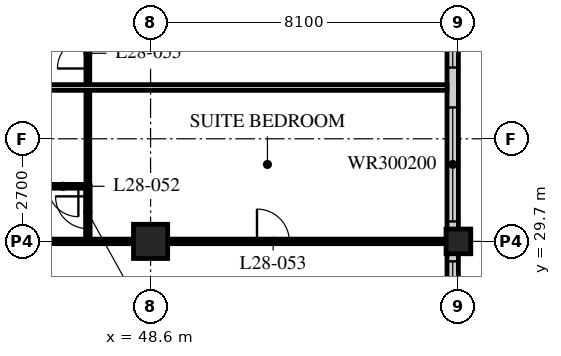
"""IFC4 building model, lengths in metres.
Left out: names, types, materials, properties, quantities, classifications, styles, units other than length and angle.
Written with IfcOpenShell. Run it as: python <this file> out.ifc"""

import sys

from ifc_helpers import new_model, si_unit, direction, frame, frame_2d, origin, origin_2d, place, context, subcontext, project, spatial, rectangle, hollow_rectangle, extrude, element, fill, save


model = new_model("IFC4")
c1 = context("Model", 3, precision=1e-05, world=origin(), true_north=direction((0.0, 1.0)))
c2 = subcontext(c1, "Body", "Model", "MODEL_VIEW")
j1 = project(units=[si_unit("LENGTHUNIT", "METRE"), si_unit("PLANEANGLEUNIT", "RADIAN")], contexts=[c1])
p1 = place(None, origin())
s1 = spatial("IfcSite", under=j1, at=p1, CompositionType="ELEMENT")
p2 = place(p1, origin())
s2 = spatial("IfcBuilding", under=s1, at=p2, CompositionType="ELEMENT")
p3 = place(p2, frame((0.0, 0.0, 113.6)))
s3 = spatial("IfcBuildingStorey", under=s2, at=p3, CompositionType="ELEMENT", Elevation=113.6)
p4 = place(p3, frame((48.6, 29.7, 0.0), z_axis=(0.0, 0.0, 1.0), x_axis=(1.0, 0.0, 0.0)))
e1 = element("IfcColumn", 1, at=p4, inside=s3, PredefinedType="COLUMN", context=c2, shape_type="SweptSolid", body=[
    extrude(hollow_rectangle(XDim=0.9, YDim=0.9, WallThickness=0.09, at=origin_2d()), origin(), (0.0, 0.0, 1.0), 3.4),
])
p5 = place(p3, frame((56.7, 29.7, 0.0), z_axis=(0.0, 0.0, 1.0), x_axis=(1.0, 0.0, 0.0)))
e2 = element("IfcColumn", 2, at=p5, inside=s3, PredefinedType="COLUMN", context=c2, shape_type="SweptSolid", body=[
    extrude(hollow_rectangle(XDim=0.65, YDim=0.65, WallThickness=0.055, at=origin_2d()), origin(), (0.0, 0.0, 1.0), 3.4),
])
p6 = place(p3, frame((56.55, 13.8, 0.0), z_axis=(0.0, 0.0, 1.0), x_axis=(0.0, 1.0, 0.0)))
e3 = element("IfcWall", 3, at=p6, inside=s3, PredefinedType="SOLIDWALL", context=c2, shape_type="SweptSolid", body=[
    extrude(rectangle(XDim=32.1, YDim=0.3, at=frame_2d((16.05, 0.0))), origin(), (0.0, 0.0, 1.0), 3.19),
])
p7 = place(p6, frame((0.225, 0.0, 0.9)))
e4 = element("IfcOpeningElement", 4, at=p7, cuts=e3, PredefinedType="OPENING", context=c2, shape_type="SweptSolid", body=[
    extrude(rectangle(XDim=3.0, YDim=2.0, at=frame_2d((1.5, 1.0))), frame((0.0, 0.16, 0.0), z_axis=(0.0, -1.0, 0.0), x_axis=(1.0, 0.0, 0.0)), (0.0, 0.0, 1.0), 0.32),
])
p8 = place(p6, frame((4.275, 0.0, 0.9)))
e5 = element("IfcOpeningElement", 5, at=p8, cuts=e3, PredefinedType="OPENING", context=c2, shape_type="SweptSolid", body=[
    extrude(rectangle(XDim=3.0, YDim=2.0, at=frame_2d((1.5, 1.0))), frame((0.0, 0.16, 0.0), z_axis=(0.0, -1.0, 0.0), x_axis=(1.0, 0.0, 0.0)), (0.0, 0.0, 1.0), 0.32),
])
p9 = place(p6, frame((8.325, 0.0, 0.9)))
e6 = element("IfcOpeningElement", 6, at=p9, cuts=e3, PredefinedType="OPENING", context=c2, shape_type="SweptSolid", body=[
    extrude(rectangle(XDim=3.0, YDim=2.0, at=frame_2d((1.5, 1.0))), frame((0.0, 0.16, 0.0), z_axis=(0.0, -1.0, 0.0), x_axis=(1.0, 0.0, 0.0)), (0.0, 0.0, 1.0), 0.32),
])
p10 = place(p6, frame((12.375, 0.0, 0.9)))
e7 = element("IfcOpeningElement", 7, at=p10, cuts=e3, PredefinedType="OPENING", context=c2, shape_type="SweptSolid", body=[
    extrude(rectangle(XDim=3.0, YDim=2.0, at=frame_2d((1.5, 1.0))), frame((0.0, 0.16, 0.0), z_axis=(0.0, -1.0, 0.0), x_axis=(1.0, 0.0, 0.0)), (0.0, 0.0, 1.0), 0.32),
])
p11 = place(p6, frame((16.425, 0.0, 0.9)))
e8 = element("IfcOpeningElement", 8, at=p11, cuts=e3, PredefinedType="OPENING", context=c2, shape_type="SweptSolid", body=[
    extrude(rectangle(XDim=3.0, YDim=2.0, at=frame_2d((1.5, 1.0))), frame((0.0, 0.16, 0.0), z_axis=(0.0, -1.0, 0.0), x_axis=(1.0, 0.0, 0.0)), (0.0, 0.0, 1.0), 0.32),
])
p12 = place(p6, frame((20.475, 0.0, 0.9)))
e9 = element("IfcOpeningElement", 9, at=p12, cuts=e3, PredefinedType="OPENING", context=c2, shape_type="SweptSolid", body=[
    extrude(rectangle(XDim=3.0, YDim=2.0, at=frame_2d((1.5, 1.0))), frame((0.0, 0.16, 0.0), z_axis=(0.0, -1.0, 0.0), x_axis=(1.0, 0.0, 0.0)), (0.0, 0.0, 1.0), 0.32),
])
p13 = place(p6, frame((24.525, 0.0, 0.9)))
e10 = element("IfcOpeningElement", 10, at=p13, cuts=e3, PredefinedType="OPENING", context=c2, shape_type="SweptSolid", body=[
    extrude(rectangle(XDim=3.0, YDim=2.0, at=frame_2d((1.5, 1.0))), frame((0.0, 0.16, 0.0), z_axis=(0.0, -1.0, 0.0), x_axis=(1.0, 0.0, 0.0)), (0.0, 0.0, 1.0), 0.32),
])
p14 = place(p6, frame((28.575, 0.0, 0.9)))
e11 = element("IfcOpeningElement", 11, at=p14, cuts=e3, PredefinedType="OPENING", context=c2, shape_type="SweptSolid", body=[
    extrude(rectangle(XDim=3.0, YDim=2.0, at=frame_2d((1.5, 1.0))), frame((0.0, 0.16, 0.0), z_axis=(0.0, -1.0, 0.0), x_axis=(1.0, 0.0, 0.0)), (0.0, 0.0, 1.0), 0.32),
])
p15 = place(p3, frame((46.95, 31.15, 0.0), z_axis=(0.0, 0.0, 1.0), x_axis=(0.0, 1.0, 0.0)))
e12 = element("IfcWall", 12, at=p15, inside=s3, PredefinedType="PARTITIONING", context=c2, shape_type="SweptSolid", body=[
    extrude(rectangle(XDim=4.4, YDim=0.1, at=frame_2d((2.2, 0.0))), origin(), (0.0, 0.0, 1.0), 3.19),
])
p16 = place(p15, frame((3.1, 0.0, 0.0)))
e13 = element("IfcOpeningElement", 13, at=p16, cuts=e12, PredefinedType="OPENING", context=c2, shape_type="SweptSolid", body=[
    extrude(rectangle(XDim=0.8, YDim=2.1, at=frame_2d((0.4, 1.05))), frame((0.0, 0.06, 0.0), z_axis=(0.0, -1.0, 0.0), x_axis=(1.0, 0.0, 0.0)), (0.0, 0.0, 1.0), 0.12),
])
p17 = place(p3, frame((44.55, 31.15, 0.0), z_axis=(0.0, 0.0, 1.0), x_axis=(1.0, 0.0, 0.0)))
e14 = element("IfcWall", 14, at=p17, inside=s3, PredefinedType="PARTITIONING", context=c2, shape_type="SweptSolid", body=[
    extrude(rectangle(XDim=2.4, YDim=0.1, at=frame_2d((1.2, 0.0))), origin(), (0.0, 0.0, 1.0), 3.19),
])
p18 = place(p17, frame((1.35, 0.0, 0.0)))
e15 = element("IfcOpeningElement", 15, at=p18, cuts=e14, PredefinedType="OPENING", context=c2, shape_type="SweptSolid", body=[
    extrude(rectangle(XDim=0.8, YDim=2.1, at=frame_2d((0.4, 1.05))), frame((0.0, 0.06, 0.0), z_axis=(0.0, -1.0, 0.0), x_axis=(1.0, 0.0, 0.0)), (0.0, 0.0, 1.0), 0.12),
])
p19 = place(p3, frame((44.55, 29.7, 0.0), z_axis=(0.0, 0.0, 1.0), x_axis=(1.0, 0.0, 0.0)))
e16 = element("IfcWall", 16, at=p19, inside=s3, PredefinedType="PARTITIONING", context=c2, shape_type="SweptSolid", body=[
    extrude(rectangle(XDim=11.85, YDim=0.12, at=frame_2d((5.925, 0.0))), origin(), (0.0, 0.0, 1.0), 2.578),
])
p20 = place(p19, frame((6.85, 0.0, 0.0)))
e17 = element("IfcOpeningElement", 17, at=p20, cuts=e16, PredefinedType="OPENING", context=c2, shape_type="SweptSolid", body=[
    extrude(rectangle(XDim=0.85, YDim=2.1, at=frame_2d((0.425, 1.05))), frame((0.0, 0.07, 0.0), z_axis=(0.0, -1.0, 0.0), x_axis=(1.0, 0.0, 0.0)), (0.0, 0.0, 1.0), 0.14),
])
p21 = place(p3, frame((44.55, 33.75, 0.0), z_axis=(0.0, 0.0, 1.0), x_axis=(1.0, 0.0, 0.0)))
e18 = element("IfcWall", 18, at=p21, inside=s3, PredefinedType="PARTITIONING", context=c2, shape_type="SweptSolid", body=[
    extrude(rectangle(XDim=11.85, YDim=0.15, at=frame_2d((5.925, 0.0))), origin(), (0.0, 0.0, 1.0), 3.19),
])
p22 = place(p3, frame((46.95, 31.16, 0.0), z_axis=(0.0, 0.0, 1.0), x_axis=(0.0, -1.0, 0.0)))
e19 = element("IfcWall", 19, at=p22, inside=s3, PredefinedType="PARTITIONING", context=c2, shape_type="SweptSolid", body=[
    extrude(rectangle(XDim=1.46, YDim=0.12, at=frame_2d((0.73, 0.0))), origin(), (0.0, 0.0, 1.0), 3.19),
])
p23 = place(p22, frame((0.275, 0.0, 0.0)))
e20 = element("IfcOpeningElement", 20, at=p23, cuts=e19, PredefinedType="OPENING", context=c2, shape_type="SweptSolid", body=[
    extrude(rectangle(XDim=0.85, YDim=2.1, at=frame_2d((0.425, 1.05))), frame((0.0, 0.07, 0.0), z_axis=(0.0, -1.0, 0.0), x_axis=(1.0, 0.0, 0.0)), (0.0, 0.0, 1.0), 0.14),
])
p24 = place(p10, origin())
e21 = element("IfcWindow", 21, at=p24, inside=s3, PartitioningType="SINGLE_PANEL", PredefinedType="WINDOW", context=c2, shape_type="SweptSolid", body=[
    extrude(rectangle(XDim=3.0, YDim=2.0, at=frame_2d((1.5, 1.0))), frame((0.0, 0.03, 0.0), z_axis=(0.0, -1.0, 0.0), x_axis=(1.0, 0.0, 0.0)), (0.0, 0.0, 1.0), 0.06),
])
fill(e7, e21)
p25 = place(p11, origin())
e22 = element("IfcWindow", 22, at=p25, inside=s3, PartitioningType="SINGLE_PANEL", PredefinedType="WINDOW", context=c2, shape_type="SweptSolid", body=[
    extrude(rectangle(XDim=3.0, YDim=2.0, at=frame_2d((1.5, 1.0))), frame((0.0, 0.03, 0.0), z_axis=(0.0, -1.0, 0.0), x_axis=(1.0, 0.0, 0.0)), (0.0, 0.0, 1.0), 0.06),
])
fill(e8, e22)
p26 = place(p12, origin())
e23 = element("IfcWindow", 23, at=p26, inside=s3, PartitioningType="SINGLE_PANEL", PredefinedType="WINDOW", context=c2, shape_type="SweptSolid", body=[
    extrude(rectangle(XDim=3.0, YDim=2.0, at=frame_2d((1.5, 1.0))), frame((0.0, 0.03, 0.0), z_axis=(0.0, -1.0, 0.0), x_axis=(1.0, 0.0, 0.0)), (0.0, 0.0, 1.0), 0.06),
])
fill(e9, e23)
p27 = place(p18, origin())
e24 = element("IfcDoor", 24, at=p27, inside=s3, OperationType="SINGLE_SWING_LEFT", PredefinedType="DOOR", context=c2, shape_type="SweptSolid", body=[
    extrude(rectangle(XDim=0.8, YDim=2.1, at=frame_2d((0.4, 1.05))), frame((0.0, 0.025, 0.0), z_axis=(0.0, -1.0, 0.0), x_axis=(1.0, 0.0, 0.0)), (0.0, 0.0, 1.0), 0.05),
])
fill(e15, e24)
p28 = place(p20, origin())
e25 = element("IfcDoor", 25, at=p28, inside=s3, OperationType="SINGLE_SWING_LEFT", PredefinedType="DOOR", context=c2, shape_type="SweptSolid", body=[
    extrude(rectangle(XDim=0.85, YDim=2.1, at=frame_2d((0.425, 1.05))), frame((0.0, 0.025, 0.0), z_axis=(0.0, -1.0, 0.0), x_axis=(1.0, 0.0, 0.0)), (0.0, 0.0, 1.0), 0.05),
])
fill(e17, e25)
p29 = place(p16, origin())
e26 = element("IfcDoor", 26, at=p29, inside=s3, OperationType="SINGLE_SWING_LEFT", PredefinedType="DOOR", context=c2, shape_type="SweptSolid", body=[
    extrude(rectangle(XDim=0.8, YDim=2.1, at=frame_2d((0.4, 1.05))), frame((0.0, 0.025, 0.0), z_axis=(0.0, -1.0, 0.0), x_axis=(1.0, 0.0, 0.0)), (0.0, 0.0, 1.0), 0.05),
])
fill(e13, e26)
p30 = place(p23, origin())
e27 = element("IfcDoor", 27, at=p30, inside=s3, OperationType="SINGLE_SWING_RIGHT", PredefinedType="DOOR", context=c2, shape_type="SweptSolid", body=[
    extrude(rectangle(XDim=0.85, YDim=2.1, at=frame_2d((0.425, 1.05))), frame((0.0, 0.025, 0.0), z_axis=(0.0, -1.0, 0.0), x_axis=(1.0, 0.0, 0.0)), (0.0, 0.0, 1.0), 0.05),
])
fill(e20, e27)
save(model, sys.argv[1])
